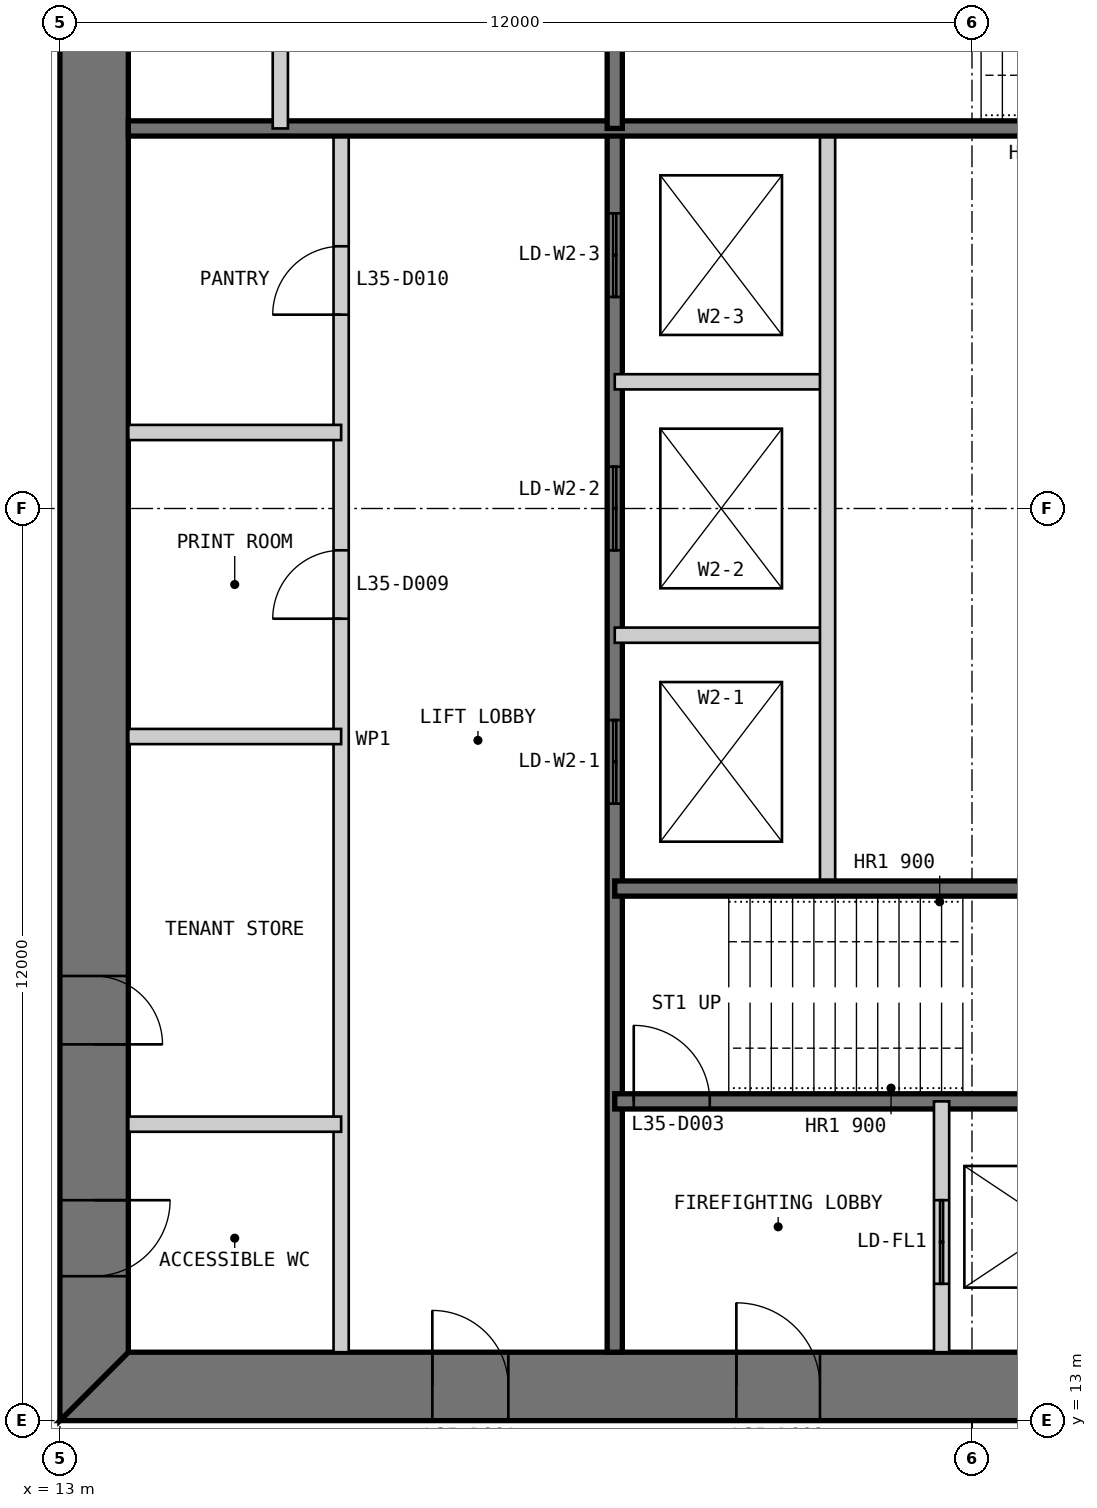
"""IFC4 building model, lengths in metres.
Left out: names, types, materials, properties, quantities, classifications, styles, units other than length and angle.
Written with IfcOpenShell. Run it as: python <this file> out.ifc"""

import sys

from ifc_helpers import new_model, si_unit, direction, frame, frame_2d, origin, place, context, subcontext, project, spatial, polyline, rectangle, outline, extrude, element, fill, save


model = new_model("IFC4")
c1 = context("Model", 3, precision=1e-05, world=origin(), true_north=direction((0.0, 1.0)))
c2 = subcontext(c1, "Body", "Model", "MODEL_VIEW")
j1 = project(units=[si_unit("LENGTHUNIT", "METRE"), si_unit("PLANEANGLEUNIT", "RADIAN")], contexts=[c1])
p1 = place(None, origin())
s1 = spatial("IfcSite", under=j1, at=p1, CompositionType="ELEMENT")
p2 = place(p1, origin())
s2 = spatial("IfcBuilding", under=s1, at=p2, CompositionType="ELEMENT")
p3 = place(p2, frame((0.0, 0.0, 150.4)))
s3 = spatial("IfcBuildingStorey", under=s2, at=p3, CompositionType="ELEMENT", Elevation=150.4)
p4 = place(p3, frame((13.0, 13.45, 0.0), z_axis=(0.0, 0.0, 1.0), x_axis=(1.0, 0.0, 0.0)))
e1 = element("IfcWall", 1, at=p4, inside=s3, PredefinedType="SHEAR", context=c2, shape_type="SweptSolid", body=[
    extrude(outline(polyline([(0.0, -0.45), (24.0, -0.45), (23.1, 0.45), (0.9, 0.45), (0.0, -0.45)])), origin(), (0.0, 0.0, 1.0), 4.0),
])
p5 = place(p4, frame((4.9, 0.0, 0.0)))
e2 = element("IfcOpeningElement", 2, at=p5, cuts=e1, PredefinedType="OPENING", context=c2, shape_type="SweptSolid", body=[
    extrude(rectangle(XDim=1.0, YDim=2.2, at=frame_2d((0.5, 1.1))), frame((0.0, 0.46, 0.0), z_axis=(0.0, -1.0, 0.0), x_axis=(1.0, 0.0, 0.0)), (0.0, 0.0, 1.0), 0.92),
])
p6 = place(p4, frame((8.9, 0.0, 0.0)))
e3 = element("IfcOpeningElement", 3, at=p6, cuts=e1, PredefinedType="OPENING", context=c2, shape_type="SweptSolid", body=[
    extrude(rectangle(XDim=1.1, YDim=2.2, at=frame_2d((0.55, 1.1))), frame((0.0, 0.46, 0.0), z_axis=(0.0, -1.0, 0.0), x_axis=(1.0, 0.0, 0.0)), (0.0, 0.0, 1.0), 0.92),
])
p7 = place(p4, frame((15.05, 0.0, 0.0)))
e4 = element("IfcOpeningElement", 4, at=p7, cuts=e1, PredefinedType="OPENING", context=c2, shape_type="SweptSolid", body=[
    extrude(rectangle(XDim=0.9, YDim=2.2, at=frame_2d((0.45, 1.1))), frame((0.0, 0.46, 0.0), z_axis=(0.0, -1.0, 0.0), x_axis=(1.0, 0.0, 0.0)), (0.0, 0.0, 1.0), 0.92),
])
p8 = place(p4, frame((17.9, 0.0, 0.0)))
e5 = element("IfcOpeningElement", 5, at=p8, cuts=e1, PredefinedType="OPENING", context=c2, shape_type="SweptSolid", body=[
    extrude(rectangle(XDim=1.0, YDim=2.2, at=frame_2d((0.5, 1.1))), frame((0.0, 0.46, 0.0), z_axis=(0.0, -1.0, 0.0), x_axis=(1.0, 0.0, 0.0)), (0.0, 0.0, 1.0), 0.92),
])
p9 = place(p4, frame((21.4, 0.0, 0.0)))
e6 = element("IfcOpeningElement", 6, at=p9, cuts=e1, PredefinedType="OPENING", context=c2, shape_type="SweptSolid", body=[
    extrude(rectangle(XDim=1.0, YDim=2.2, at=frame_2d((0.5, 1.1))), frame((0.0, 0.46, 0.0), z_axis=(0.0, -1.0, 0.0), x_axis=(1.0, 0.0, 0.0)), (0.0, 0.0, 1.0), 0.92),
])
p10 = place(p3, frame((13.45, 36.1, 0.0), z_axis=(0.0, 0.0, 1.0), x_axis=(0.0, -1.0, 0.0)))
e7 = element("IfcWall", 7, at=p10, inside=s3, PredefinedType="SHEAR", context=c2, shape_type="SweptSolid", body=[
    extrude(outline(polyline([(-0.9, -0.45), (23.1, -0.45), (22.2, 0.45), (0.0, 0.45), (-0.9, -0.45)])), origin(), (0.0, 0.0, 1.0), 4.0),
])
p11 = place(p10, frame((20.2, 0.0, 0.0)))
e8 = element("IfcOpeningElement", 8, at=p11, cuts=e7, PredefinedType="OPENING", context=c2, shape_type="SweptSolid", body=[
    extrude(rectangle(XDim=1.0, YDim=2.2, at=frame_2d((0.5, 1.1))), frame((0.0, 0.46, 0.0), z_axis=(0.0, -1.0, 0.0), x_axis=(1.0, 0.0, 0.0)), (0.0, 0.0, 1.0), 0.92),
])
p12 = place(p10, frame((17.25, 0.0, 0.0)))
e9 = element("IfcOpeningElement", 9, at=p12, cuts=e7, PredefinedType="OPENING", context=c2, shape_type="SweptSolid", body=[
    extrude(rectangle(XDim=0.9, YDim=2.2, at=frame_2d((0.45, 1.1))), frame((0.0, 0.46, 0.0), z_axis=(0.0, -1.0, 0.0), x_axis=(1.0, 0.0, 0.0)), (0.0, 0.0, 1.0), 0.92),
])
p13 = place(p3, frame((16.7, 13.9, 0.0), z_axis=(0.0, 0.0, 1.0), x_axis=(0.0, 1.0, 0.0)))
e10 = element("IfcWall", 10, at=p13, inside=s3, PredefinedType="PARTITIONING", context=c2, shape_type="SweptSolid", body=[
    extrude(rectangle(XDim=16.1, YDim=0.2, at=frame_2d((8.05, 0.0))), origin(), (0.0, 0.0, 1.0), 3.8),
])
p14 = place(p13, frame((9.65, 0.0, 0.0)))
e11 = element("IfcOpeningElement", 11, at=p14, cuts=e10, PredefinedType="OPENING", context=c2, shape_type="SweptSolid", body=[
    extrude(rectangle(XDim=0.9, YDim=2.2, at=frame_2d((0.45, 1.1))), frame((0.0, 0.11, 0.0), z_axis=(0.0, -1.0, 0.0), x_axis=(1.0, 0.0, 0.0)), (0.0, 0.0, 1.0), 0.22),
])
p15 = place(p13, frame((13.65, 0.0, 0.0)))
e12 = element("IfcOpeningElement", 12, at=p15, cuts=e10, PredefinedType="OPENING", context=c2, shape_type="SweptSolid", body=[
    extrude(rectangle(XDim=0.9, YDim=2.2, at=frame_2d((0.45, 1.1))), frame((0.0, 0.11, 0.0), z_axis=(0.0, -1.0, 0.0), x_axis=(1.0, 0.0, 0.0)), (0.0, 0.0, 1.0), 0.22),
])
p16 = place(p3, frame((20.3, 13.9, 0.0), z_axis=(0.0, 0.0, 1.0), x_axis=(0.0, 1.0, 0.0)))
e13 = element("IfcWall", 13, at=p16, inside=s3, PredefinedType="SOLIDWALL", context=c2, shape_type="SweptSolid", body=[
    extrude(rectangle(XDim=16.1, YDim=0.2, at=frame_2d((8.05, 0.0))), origin(), (0.0, 0.0, 1.0), 3.8),
])
p17 = place(p16, frame((7.217, 0.0, 0.0)))
e14 = element("IfcOpeningElement", 14, at=p17, cuts=e13, PredefinedType="OPENING", context=c2, shape_type="SweptSolid", body=[
    extrude(rectangle(XDim=1.1, YDim=2.2, at=frame_2d((0.55, 1.1))), frame((0.0, 0.11, 0.0), z_axis=(0.0, -1.0, 0.0), x_axis=(1.0, 0.0, 0.0)), (0.0, 0.0, 1.0), 0.22),
])
p18 = place(p16, frame((10.55, 0.0, 0.0)))
e15 = element("IfcOpeningElement", 15, at=p18, cuts=e13, PredefinedType="OPENING", context=c2, shape_type="SweptSolid", body=[
    extrude(rectangle(XDim=1.1, YDim=2.2, at=frame_2d((0.55, 1.1))), frame((0.0, 0.11, 0.0), z_axis=(0.0, -1.0, 0.0), x_axis=(1.0, 0.0, 0.0)), (0.0, 0.0, 1.0), 0.22),
])
p19 = place(p16, frame((13.883, 0.0, 0.0)))
e16 = element("IfcOpeningElement", 16, at=p19, cuts=e13, PredefinedType="OPENING", context=c2, shape_type="SweptSolid", body=[
    extrude(rectangle(XDim=1.1, YDim=2.2, at=frame_2d((0.55, 1.1))), frame((0.0, 0.11, 0.0), z_axis=(0.0, -1.0, 0.0), x_axis=(1.0, 0.0, 0.0)), (0.0, 0.0, 1.0), 0.22),
])
for number, where, z_axis, x_axis in (
    (17, (20.3, 23.333, 0.0), (0.0, 0.0, 1.0), (1.0, 0.0, 0.0)),
    (18, (20.3, 26.667, 0.0), (0.0, 0.0, 1.0), (1.0, 0.0, 0.0)),
):
    element("IfcWall", number, at=place(p3, frame(where, z_axis=z_axis, x_axis=x_axis)), inside=s3, PredefinedType="PARTITIONING", context=c2, shape_type="SweptSolid", body=[
        extrude(rectangle(XDim=2.8, YDim=0.2, at=frame_2d((1.4, 0.0))), origin(), (0.0, 0.0, 1.0), 3.8),
    ])
p20 = place(p3, frame((23.1, 20.0, 0.0), z_axis=(0.0, 0.0, 1.0), x_axis=(0.0, 1.0, 0.0)))
e19 = element("IfcWall", 19, at=p20, inside=s3, PredefinedType="PARTITIONING", context=c2, shape_type="SweptSolid", body=[
    extrude(rectangle(XDim=10.0, YDim=0.2, at=frame_2d((5.0, 0.0))), origin(), (0.0, 0.0, 1.0), 3.8),
])
p21 = place(p3, frame((20.3, 17.2, 0.0), z_axis=(0.0, 0.0, 1.0), x_axis=(1.0, 0.0, 0.0)))
e20 = element("IfcWall", 20, at=p21, inside=s3, PredefinedType="SOLIDWALL", context=c2, shape_type="SweptSolid", body=[
    extrude(rectangle(XDim=9.4, YDim=0.2, at=frame_2d((4.7, 0.0))), origin(), (0.0, 0.0, 1.0), 3.8),
])
p22 = place(p21, frame((0.25, 0.0, 0.0)))
e21 = element("IfcOpeningElement", 21, at=p22, cuts=e20, PredefinedType="OPENING", context=c2, shape_type="SweptSolid", body=[
    extrude(rectangle(XDim=1.0, YDim=2.2, at=frame_2d((0.5, 1.1))), frame((0.0, 0.11, 0.0), z_axis=(0.0, -1.0, 0.0), x_axis=(1.0, 0.0, 0.0)), (0.0, 0.0, 1.0), 0.22),
])
p23 = place(p3, frame((20.3, 20.0, 0.0), z_axis=(0.0, 0.0, 1.0), x_axis=(1.0, 0.0, 0.0)))
e22 = element("IfcWall", 22, at=p23, inside=s3, PredefinedType="SOLIDWALL", context=c2, shape_type="SweptSolid", body=[
    extrude(rectangle(XDim=15.8, YDim=0.2, at=frame_2d((7.9, 0.0))), origin(), (0.0, 0.0, 1.0), 3.8),
])
p24 = place(p3, frame((24.6, 13.9, 0.0), z_axis=(0.0, 0.0, 1.0), x_axis=(0.0, 1.0, 0.0)))
e23 = element("IfcWall", 23, at=p24, inside=s3, PredefinedType="PARTITIONING", context=c2, shape_type="SweptSolid", body=[
    extrude(rectangle(XDim=3.3, YDim=0.2, at=frame_2d((1.65, 0.0))), origin(), (0.0, 0.0, 1.0), 3.8),
])
p25 = place(p24, frame((0.9, 0.0, 0.0)))
e24 = element("IfcOpeningElement", 24, at=p25, cuts=e23, PredefinedType="OPENING", context=c2, shape_type="SweptSolid", body=[
    extrude(rectangle(XDim=1.1, YDim=2.2, at=frame_2d((0.55, 1.1))), frame((0.0, 0.11, 0.0), z_axis=(0.0, -1.0, 0.0), x_axis=(1.0, 0.0, 0.0)), (0.0, 0.0, 1.0), 0.22),
])
for number, where, z_axis, x_axis in (
    (25, (13.9, 16.9, 0.0), (0.0, 0.0, 1.0), (1.0, 0.0, 0.0)),
    (26, (13.9, 22.0, 0.0), (0.0, 0.0, 1.0), (1.0, 0.0, 0.0)),
    (27, (13.9, 26.0, 0.0), (0.0, 0.0, 1.0), (1.0, 0.0, 0.0)),
):
    element("IfcWall", number, at=place(p3, frame(where, z_axis=z_axis, x_axis=x_axis)), inside=s3, PredefinedType="PARTITIONING", context=c2, shape_type="SweptSolid", body=[
        extrude(rectangle(XDim=2.8, YDim=0.2, at=frame_2d((1.4, 0.0))), origin(), (0.0, 0.0, 1.0), 3.8),
    ])
p26 = place(p3, frame((29.7, 30.0, 0.0), z_axis=(0.0, 0.0, 1.0), x_axis=(-1.0, 0.0, 0.0)))
e28 = element("IfcWall", 28, at=p26, inside=s3, PredefinedType="SOLIDWALL", context=c2, shape_type="SweptSolid", body=[
    extrude(rectangle(XDim=15.8, YDim=0.2, at=frame_2d((7.9, 0.0))), origin(), (0.0, 0.0, 1.0), 3.8),
])
p27 = place(p3, frame((20.3, 36.1, 0.0), z_axis=(0.0, 0.0, 1.0), x_axis=(0.0, -1.0, 0.0)))
e29 = element("IfcWall", 29, at=p27, inside=s3, PredefinedType="SOLIDWALL", context=c2, shape_type="SweptSolid", body=[
    extrude(rectangle(XDim=6.1, YDim=0.2, at=frame_2d((3.05, 0.0))), origin(), (0.0, 0.0, 1.0), 3.8),
])
p28 = place(p3, frame((15.9, 36.1, 0.0), z_axis=(0.0, 0.0, 1.0), x_axis=(0.0, -1.0, 0.0)))
e30 = element("IfcWall", 30, at=p28, inside=s3, PredefinedType="PARTITIONING", context=c2, shape_type="SweptSolid", body=[
    extrude(rectangle(XDim=6.1, YDim=0.2, at=frame_2d((3.05, 0.0))), origin(), (0.0, 0.0, 1.0), 3.8),
])
p29 = place(p5, origin())
e31 = element("IfcDoor", 31, at=p29, inside=s3, OperationType="SINGLE_SWING_LEFT", PredefinedType="DOOR", context=c2, shape_type="SweptSolid", body=[
    extrude(rectangle(XDim=1.0, YDim=2.2, at=frame_2d((0.5, 1.1))), frame((0.0, 0.025, 0.0), z_axis=(0.0, -1.0, 0.0), x_axis=(1.0, 0.0, 0.0)), (0.0, 0.0, 1.0), 0.05),
    extrude(outline(polyline([(0.0, 0.0), (0.04, 0.0), (0.04, 2.16), (0.96, 2.16), (0.96, 0.0), (1.0, 0.0), (1.0, 2.2), (0.0, 2.2), (0.0, 0.0)])), frame((0.0, 0.3, 0.0), z_axis=(0.0, -1.0, 0.0), x_axis=(1.0, 0.0, 0.0)), (0.0, 0.0, 1.0), 0.6),
])
fill(e2, e31)
p30 = place(p6, origin())
e32 = element("IfcDoor", 32, at=p30, inside=s3, OperationType="SINGLE_SWING_LEFT", PredefinedType="DOOR", context=c2, shape_type="SweptSolid", body=[
    extrude(rectangle(XDim=1.1, YDim=2.2, at=frame_2d((0.55, 1.1))), frame((0.0, 0.025, 0.0), z_axis=(0.0, -1.0, 0.0), x_axis=(1.0, 0.0, 0.0)), (0.0, 0.0, 1.0), 0.05),
    extrude(outline(polyline([(0.0, 0.0), (0.04, 0.0), (0.04, 2.16), (1.06, 2.16), (1.06, 0.0), (1.1, 0.0), (1.1, 2.2), (0.0, 2.2), (0.0, 0.0)])), frame((0.0, 0.3, 0.0), z_axis=(0.0, -1.0, 0.0), x_axis=(1.0, 0.0, 0.0)), (0.0, 0.0, 1.0), 0.6),
])
fill(e3, e32)
p31 = place(p22, origin())
e33 = element("IfcDoor", 33, at=p31, inside=s3, OperationType="SINGLE_SWING_LEFT", PredefinedType="DOOR", context=c2, shape_type="SweptSolid", body=[
    extrude(rectangle(XDim=1.0, YDim=2.2, at=frame_2d((0.5, 1.1))), frame((0.0, 0.025, 0.0), z_axis=(0.0, -1.0, 0.0), x_axis=(1.0, 0.0, 0.0)), (0.0, 0.0, 1.0), 0.05),
])
fill(e21, e33)
p32 = place(p11, origin())
e34 = element("IfcDoor", 34, at=p32, inside=s3, OperationType="SINGLE_SWING_LEFT", PredefinedType="DOOR", context=c2, shape_type="SweptSolid", body=[
    extrude(rectangle(XDim=1.0, YDim=2.2, at=frame_2d((0.5, 1.1))), frame((0.0, 0.025, 0.0), z_axis=(0.0, -1.0, 0.0), x_axis=(1.0, 0.0, 0.0)), (0.0, 0.0, 1.0), 0.05),
    extrude(outline(polyline([(0.0, 0.0), (0.04, 0.0), (0.04, 2.16), (0.96, 2.16), (0.96, 0.0), (1.0, 0.0), (1.0, 2.2), (0.0, 2.2), (0.0, 0.0)])), frame((0.0, 0.3, 0.0), z_axis=(0.0, -1.0, 0.0), x_axis=(1.0, 0.0, 0.0)), (0.0, 0.0, 1.0), 0.6),
])
fill(e8, e34)
p33 = place(p12, origin())
e35 = element("IfcDoor", 35, at=p33, inside=s3, OperationType="SINGLE_SWING_RIGHT", PredefinedType="DOOR", context=c2, shape_type="SweptSolid", body=[
    extrude(rectangle(XDim=0.9, YDim=2.2, at=frame_2d((0.45, 1.1))), frame((0.0, 0.025, 0.0), z_axis=(0.0, -1.0, 0.0), x_axis=(1.0, 0.0, 0.0)), (0.0, 0.0, 1.0), 0.05),
    extrude(outline(polyline([(0.0, 0.0), (0.04, 0.0), (0.04, 2.16), (0.86, 2.16), (0.86, 0.0), (0.9, 0.0), (0.9, 2.2), (0.0, 2.2), (0.0, 0.0)])), frame((0.0, 0.3, 0.0), z_axis=(0.0, -1.0, 0.0), x_axis=(1.0, 0.0, 0.0)), (0.0, 0.0, 1.0), 0.6),
])
fill(e9, e35)
p34 = place(p14, origin())
e36 = element("IfcDoor", 36, at=p34, inside=s3, OperationType="SINGLE_SWING_LEFT", PredefinedType="DOOR", context=c2, shape_type="SweptSolid", body=[
    extrude(rectangle(XDim=0.9, YDim=2.2, at=frame_2d((0.45, 1.1))), frame((0.0, 0.025, 0.0), z_axis=(0.0, -1.0, 0.0), x_axis=(1.0, 0.0, 0.0)), (0.0, 0.0, 1.0), 0.05),
])
fill(e11, e36)
p35 = place(p15, origin())
e37 = element("IfcDoor", 37, at=p35, inside=s3, OperationType="SINGLE_SWING_LEFT", PredefinedType="DOOR", context=c2, shape_type="SweptSolid", body=[
    extrude(rectangle(XDim=0.9, YDim=2.2, at=frame_2d((0.45, 1.1))), frame((0.0, 0.025, 0.0), z_axis=(0.0, -1.0, 0.0), x_axis=(1.0, 0.0, 0.0)), (0.0, 0.0, 1.0), 0.05),
])
fill(e12, e37)
p36 = place(p25, origin())
e38 = element("IfcDoor", 38, at=p36, inside=s3, OperationType="DOUBLE_DOOR_SLIDING", PredefinedType="DOOR", context=c2, shape_type="SweptSolid", body=[
    extrude(rectangle(XDim=1.1, YDim=2.2, at=frame_2d((0.55, 1.1))), frame((0.0, 0.025, 0.0), z_axis=(0.0, -1.0, 0.0), x_axis=(1.0, 0.0, 0.0)), (0.0, 0.0, 1.0), 0.05),
])
fill(e24, e38)
p37 = place(p17, origin())
e39 = element("IfcDoor", 39, at=p37, inside=s3, OperationType="DOUBLE_DOOR_SLIDING", PredefinedType="DOOR", context=c2, shape_type="SweptSolid", body=[
    extrude(rectangle(XDim=1.1, YDim=2.2, at=frame_2d((0.55, 1.1))), frame((0.0, 0.025, 0.0), z_axis=(0.0, -1.0, 0.0), x_axis=(1.0, 0.0, 0.0)), (0.0, 0.0, 1.0), 0.05),
])
fill(e14, e39)
p38 = place(p18, origin())
e40 = element("IfcDoor", 40, at=p38, inside=s3, OperationType="DOUBLE_DOOR_SLIDING", PredefinedType="DOOR", context=c2, shape_type="SweptSolid", body=[
    extrude(rectangle(XDim=1.1, YDim=2.2, at=frame_2d((0.55, 1.1))), frame((0.0, 0.025, 0.0), z_axis=(0.0, -1.0, 0.0), x_axis=(1.0, 0.0, 0.0)), (0.0, 0.0, 1.0), 0.05),
])
fill(e15, e40)
p39 = place(p19, origin())
e41 = element("IfcDoor", 41, at=p39, inside=s3, OperationType="DOUBLE_DOOR_SLIDING", PredefinedType="DOOR", context=c2, shape_type="SweptSolid", body=[
    extrude(rectangle(XDim=1.1, YDim=2.2, at=frame_2d((0.55, 1.1))), frame((0.0, 0.025, 0.0), z_axis=(0.0, -1.0, 0.0), x_axis=(1.0, 0.0, 0.0)), (0.0, 0.0, 1.0), 0.05),
])
fill(e16, e41)
save(model, sys.argv[1])
